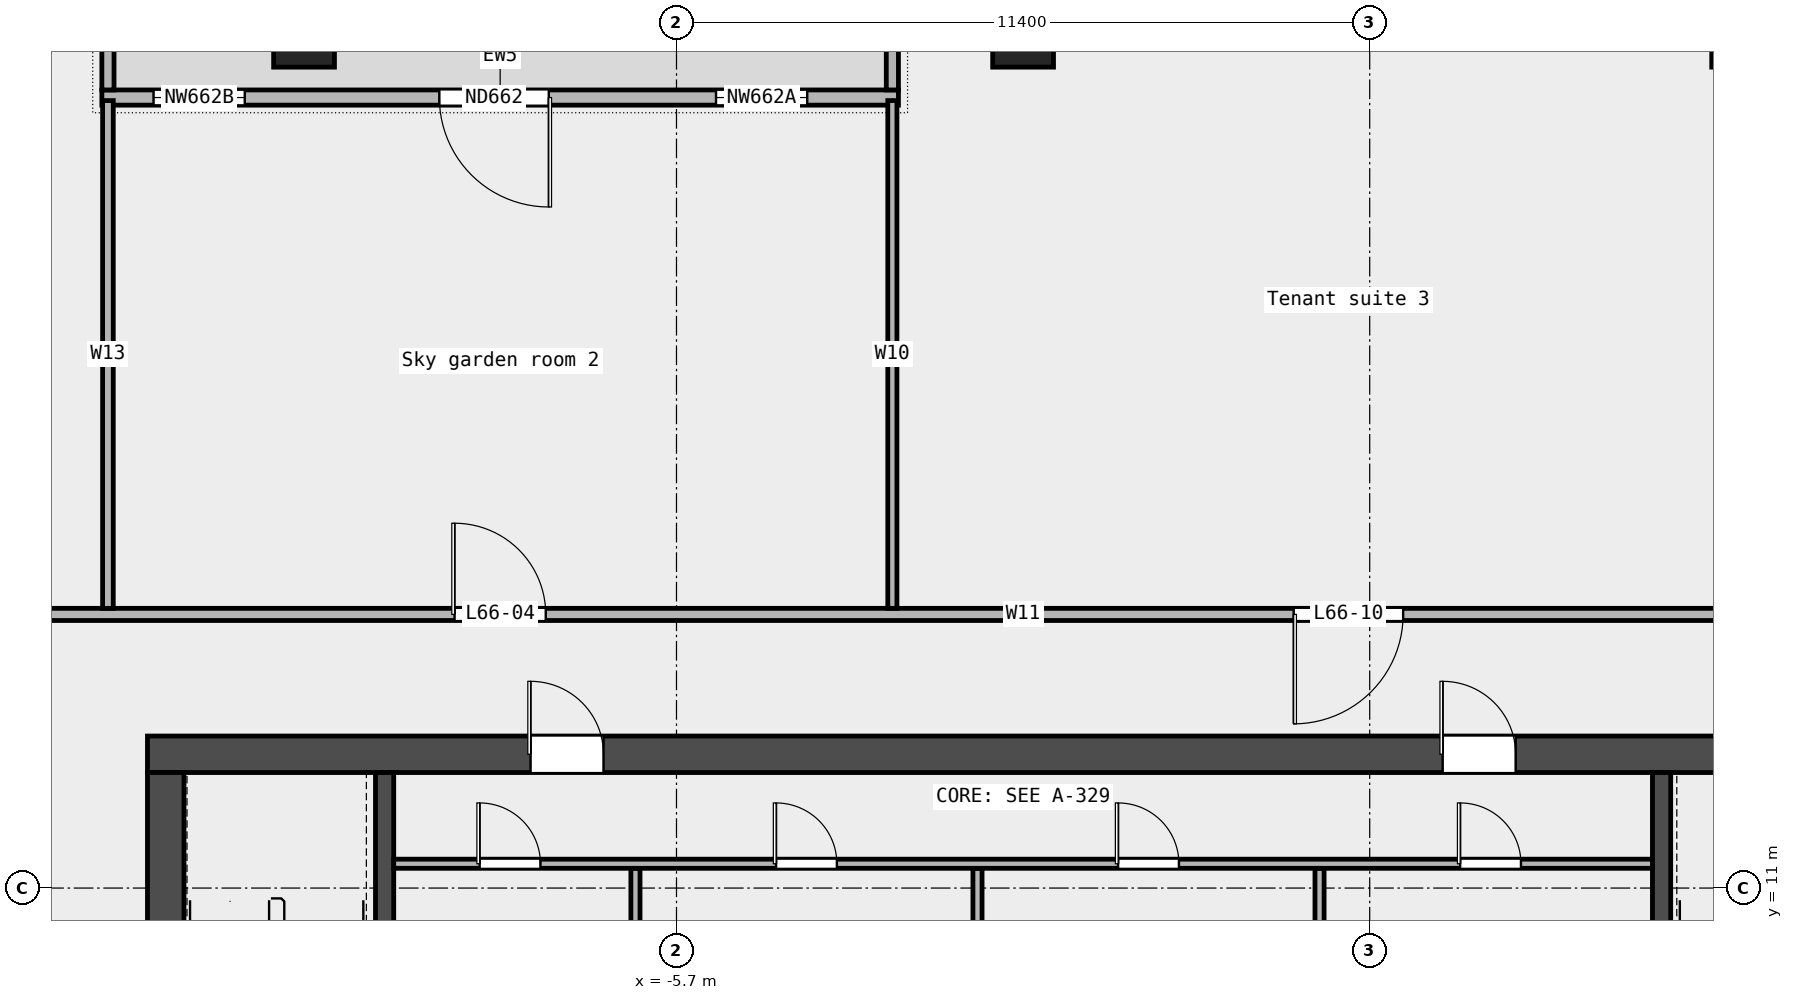
"""IFC4 building model, lengths in metres.
Left out: names, types, materials, properties, quantities, classifications, styles, units other than length and angle.
Written with IfcOpenShell. Run it as: python <this file> out.ifc"""

import sys

from ifc_helpers import new_model, si_unit, direction, frame, frame_2d, origin, origin_2d, place, context, subcontext, project, spatial, rectangle, extrude, element, fill, save


model = new_model("IFC4")
c1 = context("Model", 3, precision=1e-05, world=origin(), true_north=direction((0.0, 1.0)))
c2 = subcontext(c1, "Body", "Model", "MODEL_VIEW")
j1 = project(units=[si_unit("LENGTHUNIT", "METRE"), si_unit("PLANEANGLEUNIT", "RADIAN")], contexts=[c1])
p1 = place(None, origin())
s1 = spatial("IfcSite", under=j1, at=p1, CompositionType="ELEMENT")
p2 = place(p1, origin())
s2 = spatial("IfcBuilding", under=s1, at=p2, CompositionType="ELEMENT")
p3 = place(p2, frame((0.0, 0.0, 303.4)))
s3 = spatial("IfcBuildingStorey", under=s2, at=p3, CompositionType="ELEMENT", Elevation=303.4)
for number, where, z_axis, x_axis in (
    (1, (11.825, 25.0, 0.0), (0.0, 0.0, 1.0), (1.0, 0.0, 0.0)),
    (2, (0.0, 25.0, 0.0), (0.0, 0.0, 1.0), (1.0, 0.0, 0.0)),
    (3, (-11.825, 25.0, 0.0), (0.0, 0.0, 1.0), (1.0, 0.0, 0.0)),
):
    element("IfcColumn", number, at=place(p3, frame(where, z_axis=z_axis, x_axis=x_axis)), inside=s3, PredefinedType="COLUMN", context=c2, shape_type="SweptSolid", body=[
        extrude(rectangle(XDim=1.0, YDim=1.0, at=origin_2d()), origin(), (0.0, 0.0, 1.0), 3.6),
    ])
p4 = place(p3, frame((-2.05, 24.0, 0.0), z_axis=(0.0, 0.0, 1.0), x_axis=(-1.0, 0.0, 0.0)))
e4 = element("IfcWall", 4, at=p4, inside=s3, PredefinedType="STANDARD", context=c2, shape_type="SweptSolid", body=[
    extrude(rectangle(XDim=13.1, YDim=0.25, at=frame_2d((6.55, 0.0))), origin(), (0.0, 0.0, 1.0), 3.6),
])
p5 = place(p4, frame((1.5, 0.0, 0.45)))
e5 = element("IfcOpeningElement", 5, at=p5, cuts=e4, PredefinedType="OPENING", context=c2, shape_type="SweptSolid", body=[
    extrude(rectangle(XDim=1.5, YDim=2.4, at=frame_2d((0.75, 1.2))), frame((0.0, 0.137, 0.0), z_axis=(0.0, -1.0, 0.0), x_axis=(1.0, 0.0, 0.0)), (0.0, 0.0, 1.0), 0.274),
])
p6 = place(p4, frame((5.75, 0.0, 0.0)))
e6 = element("IfcOpeningElement", 6, at=p6, cuts=e4, PredefinedType="OPENING", context=c2, shape_type="SweptSolid", body=[
    extrude(rectangle(XDim=1.8, YDim=2.4, at=frame_2d((0.9, 1.2))), frame((0.0, 0.137, 0.0), z_axis=(0.0, -1.0, 0.0), x_axis=(1.0, 0.0, 0.0)), (0.0, 0.0, 1.0), 0.274),
])
p7 = place(p4, frame((10.75, 0.0, 0.45)))
e7 = element("IfcOpeningElement", 7, at=p7, cuts=e4, PredefinedType="OPENING", context=c2, shape_type="SweptSolid", body=[
    extrude(rectangle(XDim=1.5, YDim=2.4, at=frame_2d((0.75, 1.2))), frame((0.0, 0.137, 0.0), z_axis=(0.0, -1.0, 0.0), x_axis=(1.0, 0.0, 0.0)), (0.0, 0.0, 1.0), 0.274),
])
for number, where, z_axis, x_axis in (
    (8, (-2.15, 26.0, 0.0), (0.0, 0.0, 1.0), (0.0, -1.0, 0.0)),
    (9, (-15.05, 26.0, 0.0), (0.0, 0.0, 1.0), (0.0, -1.0, 0.0)),
):
    element("IfcWall", number, at=place(p3, frame(where, z_axis=z_axis, x_axis=x_axis)), inside=s3, PredefinedType="STANDARD", context=c2, shape_type="SweptSolid", body=[
        extrude(rectangle(XDim=1.875, YDim=0.2, at=frame_2d((0.938, 0.0))), origin(), (0.0, 0.0, 1.0), 3.6),
    ])
p8 = place(p3, frame((-29.6, 15.5, 0.0), z_axis=(0.0, 0.0, 1.0), x_axis=(1.0, 0.0, 0.0)))
e10 = element("IfcWall", 10, at=p8, inside=s3, PredefinedType="PARTITIONING", context=c2, shape_type="SweptSolid", body=[
    extrude(rectangle(XDim=59.2, YDim=0.2, at=frame_2d((29.6, 0.0))), origin(), (0.0, 0.0, 1.0), 3.6),
])
p9 = place(p8, frame((20.25, 0.0, 0.0)))
e11 = element("IfcOpeningElement", 11, at=p9, cuts=e10, PredefinedType="OPENING", context=c2, shape_type="SweptSolid", body=[
    extrude(rectangle(XDim=1.5, YDim=2.1, at=frame_2d((0.75, 1.05))), frame((0.0, 0.112, 0.0), z_axis=(0.0, -1.0, 0.0), x_axis=(1.0, 0.0, 0.0)), (0.0, 0.0, 1.0), 0.224),
])
p10 = place(p8, frame((49.825, 0.0, 0.0)))
e12 = element("IfcOpeningElement", 12, at=p10, cuts=e10, PredefinedType="OPENING", context=c2, shape_type="SweptSolid", body=[
    extrude(rectangle(XDim=1.8, YDim=2.1, at=frame_2d((0.9, 1.05))), frame((0.0, 0.112, 0.0), z_axis=(0.0, -1.0, 0.0), x_axis=(1.0, 0.0, 0.0)), (0.0, 0.0, 1.0), 0.224),
])
p11 = place(p8, frame((34.05, 0.0, 0.0)))
e13 = element("IfcOpeningElement", 13, at=p11, cuts=e10, PredefinedType="OPENING", context=c2, shape_type="SweptSolid", body=[
    extrude(rectangle(XDim=1.8, YDim=2.1, at=frame_2d((0.9, 1.05))), frame((0.0, 0.112, 0.0), z_axis=(0.0, -1.0, 0.0), x_axis=(1.0, 0.0, 0.0)), (0.0, 0.0, 1.0), 0.224),
])
p12 = place(p8, frame((6.625, 0.0, 0.0)))
e14 = element("IfcOpeningElement", 14, at=p12, cuts=e10, PredefinedType="OPENING", context=c2, shape_type="SweptSolid", body=[
    extrude(rectangle(XDim=1.5, YDim=2.1, at=frame_2d((0.75, 1.05))), frame((0.0, 0.112, 0.0), z_axis=(0.0, -1.0, 0.0), x_axis=(1.0, 0.0, 0.0)), (0.0, 0.0, 1.0), 0.224),
])
p13 = place(p3, frame((-15.05, 15.6, 0.0), z_axis=(0.0, 0.0, 1.0), x_axis=(0.0, 1.0, 0.0)))
e15 = element("IfcWall", 15, at=p13, inside=s3, PredefinedType="PARTITIONING", context=c2, shape_type="SweptSolid", body=[
    extrude(rectangle(XDim=8.35, YDim=0.175, at=frame_2d((4.175, 0.0))), origin(), (0.0, 0.0, 1.0), 3.6),
])
p14 = place(p3, frame((-2.15, 15.6, 0.0), z_axis=(0.0, 0.0, 1.0), x_axis=(0.0, 1.0, 0.0)))
e16 = element("IfcWall", 16, at=p14, inside=s3, PredefinedType="PARTITIONING", context=c2, shape_type="SweptSolid", body=[
    extrude(rectangle(XDim=8.35, YDim=0.15, at=frame_2d((4.175, 0.0))), origin(), (0.0, 0.0, 1.0), 3.6),
])
p15 = place(p3, frame((-14.4, 13.2, 0.0), z_axis=(0.0, 0.0, 1.0), x_axis=(1.0, 0.0, 0.0)))
e17 = element("IfcWall", 17, at=p15, inside=s3, PredefinedType="SHEAR", context=c2, shape_type="SweptSolid", body=[
    extrude(rectangle(XDim=28.8, YDim=0.6, at=frame_2d((14.4, 0.0))), origin(), (0.0, 0.0, 1.0), 3.7),
])
p16 = place(p15, frame((6.3, 0.0, 0.0)))
e18 = element("IfcOpeningElement", 18, at=p16, cuts=e17, PredefinedType="OPENING", context=c2, shape_type="SweptSolid", body=[
    extrude(rectangle(XDim=1.2, YDim=2.1, at=frame_2d((0.6, 1.05))), frame((0.0, 0.312, 0.0), z_axis=(0.0, -1.0, 0.0), x_axis=(1.0, 0.0, 0.0)), (0.0, 0.0, 1.0), 0.624),
])
p17 = place(p15, frame((21.3, 0.0, 0.0)))
e19 = element("IfcOpeningElement", 19, at=p17, cuts=e17, PredefinedType="OPENING", context=c2, shape_type="SweptSolid", body=[
    extrude(rectangle(XDim=1.2, YDim=2.1, at=frame_2d((0.6, 1.05))), frame((0.0, 0.312, 0.0), z_axis=(0.0, -1.0, 0.0), x_axis=(1.0, 0.0, 0.0)), (0.0, 0.0, 1.0), 0.624),
])
p18 = place(p3, frame((-14.1, -6.6, 0.0), z_axis=(0.0, 0.0, 1.0), x_axis=(0.0, 1.0, 0.0)))
e20 = element("IfcWall", 20, at=p18, inside=s3, PredefinedType="SHEAR", context=c2, shape_type="SweptSolid", body=[
    extrude(rectangle(XDim=19.5, YDim=0.6, at=frame_2d((9.75, 0.0))), origin(), (0.0, 0.0, 1.0), 3.7),
])
p19 = place(p18, frame((9.3, 0.0, 0.0)))
e21 = element("IfcOpeningElement", 21, at=p19, cuts=e20, PredefinedType="OPENING", context=c2, shape_type="SweptSolid", body=[
    extrude(rectangle(XDim=1.8, YDim=2.1, at=frame_2d((0.9, 1.05))), frame((0.0, 0.312, 0.0), z_axis=(0.0, -1.0, 0.0), x_axis=(1.0, 0.0, 0.0)), (0.0, 0.0, 1.0), 0.624),
])
for number, where, z_axis, x_axis in (
    (22, (-10.5, 5.25, 0.0), (0.0, 0.0, 1.0), (0.0, 1.0, 0.0)),
    (23, (10.5, 5.25, 0.0), (0.0, 0.0, 1.0), (0.0, 1.0, 0.0)),
):
    element("IfcWall", number, at=place(p3, frame(where, z_axis=z_axis, x_axis=x_axis)), inside=s3, PredefinedType="SHEAR", context=c2, shape_type="SweptSolid", body=[
        extrude(rectangle(XDim=7.65, YDim=0.3, at=frame_2d((3.825, 0.0))), origin(), (0.0, 0.0, 1.0), 3.7),
    ])
for number, where, z_axis, x_axis in (
    (24, (-6.375, 8.55, 0.0), (0.0, 0.0, 1.0), (0.0, 1.0, 0.0)),
    (25, (-0.75, 8.55, 0.0), (0.0, 0.0, 1.0), (0.0, 1.0, 0.0)),
    (26, (4.875, 8.55, 0.0), (0.0, 0.0, 1.0), (0.0, 1.0, 0.0)),
):
    element("IfcWall", number, at=place(p3, frame(where, z_axis=z_axis, x_axis=x_axis)), inside=s3, PredefinedType="PARTITIONING", context=c2, shape_type="SweptSolid", body=[
        extrude(rectangle(XDim=2.775, YDim=0.15, at=frame_2d((1.387, 0.0))), origin(), (0.0, 0.0, 1.0), 3.7),
    ])
p20 = place(p3, frame((-10.35, 11.4, 0.0), z_axis=(0.0, 0.0, 1.0), x_axis=(1.0, 0.0, 0.0)))
e27 = element("IfcWall", 27, at=p20, inside=s3, PredefinedType="PARTITIONING", context=c2, shape_type="SweptSolid", body=[
    extrude(rectangle(XDim=20.7, YDim=0.15, at=frame_2d((10.35, 0.0))), origin(), (0.0, 0.0, 1.0), 3.7),
])
p21 = place(p20, frame((1.413, 0.0, 0.0)))
e28 = element("IfcOpeningElement", 28, at=p21, cuts=e27, PredefinedType="OPENING", context=c2, shape_type="SweptSolid", body=[
    extrude(rectangle(XDim=1.0, YDim=2.1, at=frame_2d((0.5, 1.05))), frame((0.0, 0.087, 0.0), z_axis=(0.0, -1.0, 0.0), x_axis=(1.0, 0.0, 0.0)), (0.0, 0.0, 1.0), 0.174),
])
p22 = place(p20, frame((6.288, 0.0, 0.0)))
e29 = element("IfcOpeningElement", 29, at=p22, cuts=e27, PredefinedType="OPENING", context=c2, shape_type="SweptSolid", body=[
    extrude(rectangle(XDim=1.0, YDim=2.1, at=frame_2d((0.5, 1.05))), frame((0.0, 0.087, 0.0), z_axis=(0.0, -1.0, 0.0), x_axis=(1.0, 0.0, 0.0)), (0.0, 0.0, 1.0), 0.174),
])
p23 = place(p20, frame((11.913, 0.0, 0.0)))
e30 = element("IfcOpeningElement", 30, at=p23, cuts=e27, PredefinedType="OPENING", context=c2, shape_type="SweptSolid", body=[
    extrude(rectangle(XDim=1.0, YDim=2.1, at=frame_2d((0.5, 1.05))), frame((0.0, 0.087, 0.0), z_axis=(0.0, -1.0, 0.0), x_axis=(1.0, 0.0, 0.0)), (0.0, 0.0, 1.0), 0.174),
])
p24 = place(p20, frame((17.538, 0.0, 0.0)))
e31 = element("IfcOpeningElement", 31, at=p24, cuts=e27, PredefinedType="OPENING", context=c2, shape_type="SweptSolid", body=[
    extrude(rectangle(XDim=1.0, YDim=2.1, at=frame_2d((0.5, 1.05))), frame((0.0, 0.087, 0.0), z_axis=(0.0, -1.0, 0.0), x_axis=(1.0, 0.0, 0.0)), (0.0, 0.0, 1.0), 0.174),
])
p25 = place(p5, origin())
e32 = element("IfcWindow", 32, at=p25, inside=s3, PartitioningType="SINGLE_PANEL", PredefinedType="WINDOW", context=c2, shape_type="SweptSolid", body=[
    extrude(rectangle(XDim=1.5, YDim=2.4, at=frame_2d((0.75, 1.2))), frame((0.0, 0.03, 0.0), z_axis=(0.0, -1.0, 0.0), x_axis=(1.0, 0.0, 0.0)), (0.0, 0.0, 1.0), 0.06),
])
fill(e5, e32)
p26 = place(p6, origin())
e33 = element("IfcDoor", 33, at=p26, inside=s3, OperationType="DOUBLE_DOOR_SINGLE_SWING", PredefinedType="DOOR", context=c2, shape_type="SweptSolid", body=[
    extrude(rectangle(XDim=1.8, YDim=2.4, at=frame_2d((0.9, 1.2))), frame((0.0, 0.025, 0.0), z_axis=(0.0, -1.0, 0.0), x_axis=(1.0, 0.0, 0.0)), (0.0, 0.0, 1.0), 0.05),
])
fill(e6, e33)
p27 = place(p7, origin())
e34 = element("IfcWindow", 34, at=p27, inside=s3, PartitioningType="SINGLE_PANEL", PredefinedType="WINDOW", context=c2, shape_type="SweptSolid", body=[
    extrude(rectangle(XDim=1.5, YDim=2.4, at=frame_2d((0.75, 1.2))), frame((0.0, 0.03, 0.0), z_axis=(0.0, -1.0, 0.0), x_axis=(1.0, 0.0, 0.0)), (0.0, 0.0, 1.0), 0.06),
])
fill(e7, e34)
p28 = place(p9, origin())
e35 = element("IfcDoor", 35, at=p28, inside=s3, OperationType="DOUBLE_DOOR_SINGLE_SWING", PredefinedType="DOOR", context=c2, shape_type="SweptSolid", body=[
    extrude(rectangle(XDim=1.5, YDim=2.1, at=frame_2d((0.75, 1.05))), frame((0.0, 0.025, 0.0), z_axis=(0.0, -1.0, 0.0), x_axis=(1.0, 0.0, 0.0)), (0.0, 0.0, 1.0), 0.05),
])
fill(e11, e35)
p29 = place(p11, origin())
e36 = element("IfcDoor", 36, at=p29, inside=s3, OperationType="DOUBLE_DOOR_SINGLE_SWING", PredefinedType="DOOR", context=c2, shape_type="SweptSolid", body=[
    extrude(rectangle(XDim=1.8, YDim=2.1, at=frame_2d((0.9, 1.05))), frame((0.0, 0.025, 0.0), z_axis=(0.0, -1.0, 0.0), x_axis=(1.0, 0.0, 0.0)), (0.0, 0.0, 1.0), 0.05),
])
fill(e13, e36)
p30 = place(p21, origin())
e37 = element("IfcDoor", 37, at=p30, inside=s3, OperationType="SINGLE_SWING_LEFT", PredefinedType="DOOR", context=c2, shape_type="SweptSolid", body=[
    extrude(rectangle(XDim=1.0, YDim=2.1, at=frame_2d((0.5, 1.05))), frame((0.0, 0.025, 0.0), z_axis=(0.0, -1.0, 0.0), x_axis=(1.0, 0.0, 0.0)), (0.0, 0.0, 1.0), 0.05),
])
fill(e28, e37)
p31 = place(p22, origin())
e38 = element("IfcDoor", 38, at=p31, inside=s3, OperationType="SINGLE_SWING_LEFT", PredefinedType="DOOR", context=c2, shape_type="SweptSolid", body=[
    extrude(rectangle(XDim=1.0, YDim=2.1, at=frame_2d((0.5, 1.05))), frame((0.0, 0.025, 0.0), z_axis=(0.0, -1.0, 0.0), x_axis=(1.0, 0.0, 0.0)), (0.0, 0.0, 1.0), 0.05),
])
fill(e29, e38)
p32 = place(p23, origin())
e39 = element("IfcDoor", 39, at=p32, inside=s3, OperationType="SINGLE_SWING_LEFT", PredefinedType="DOOR", context=c2, shape_type="SweptSolid", body=[
    extrude(rectangle(XDim=1.0, YDim=2.1, at=frame_2d((0.5, 1.05))), frame((0.0, 0.025, 0.0), z_axis=(0.0, -1.0, 0.0), x_axis=(1.0, 0.0, 0.0)), (0.0, 0.0, 1.0), 0.05),
])
fill(e30, e39)
p33 = place(p24, origin())
e40 = element("IfcDoor", 40, at=p33, inside=s3, OperationType="SINGLE_SWING_LEFT", PredefinedType="DOOR", context=c2, shape_type="SweptSolid", body=[
    extrude(rectangle(XDim=1.0, YDim=2.1, at=frame_2d((0.5, 1.05))), frame((0.0, 0.025, 0.0), z_axis=(0.0, -1.0, 0.0), x_axis=(1.0, 0.0, 0.0)), (0.0, 0.0, 1.0), 0.05),
])
fill(e31, e40)
p34 = place(p16, origin())
e41 = element("IfcDoor", 41, at=p34, inside=s3, OperationType="SINGLE_SWING_LEFT", PredefinedType="DOOR", context=c2, shape_type="SweptSolid", body=[
    extrude(rectangle(XDim=1.2, YDim=2.1, at=frame_2d((0.6, 1.05))), frame((0.0, 0.025, 0.0), z_axis=(0.0, -1.0, 0.0), x_axis=(1.0, 0.0, 0.0)), (0.0, 0.0, 1.0), 0.05),
])
fill(e18, e41)
p35 = place(p17, origin())
e42 = element("IfcDoor", 42, at=p35, inside=s3, OperationType="SINGLE_SWING_RIGHT", PredefinedType="DOOR", context=c2, shape_type="SweptSolid", body=[
    extrude(rectangle(XDim=1.2, YDim=2.1, at=frame_2d((0.6, 1.05))), frame((0.0, 0.025, 0.0), z_axis=(0.0, -1.0, 0.0), x_axis=(1.0, 0.0, 0.0)), (0.0, 0.0, 1.0), 0.05),
])
fill(e19, e42)
save(model, sys.argv[1])
